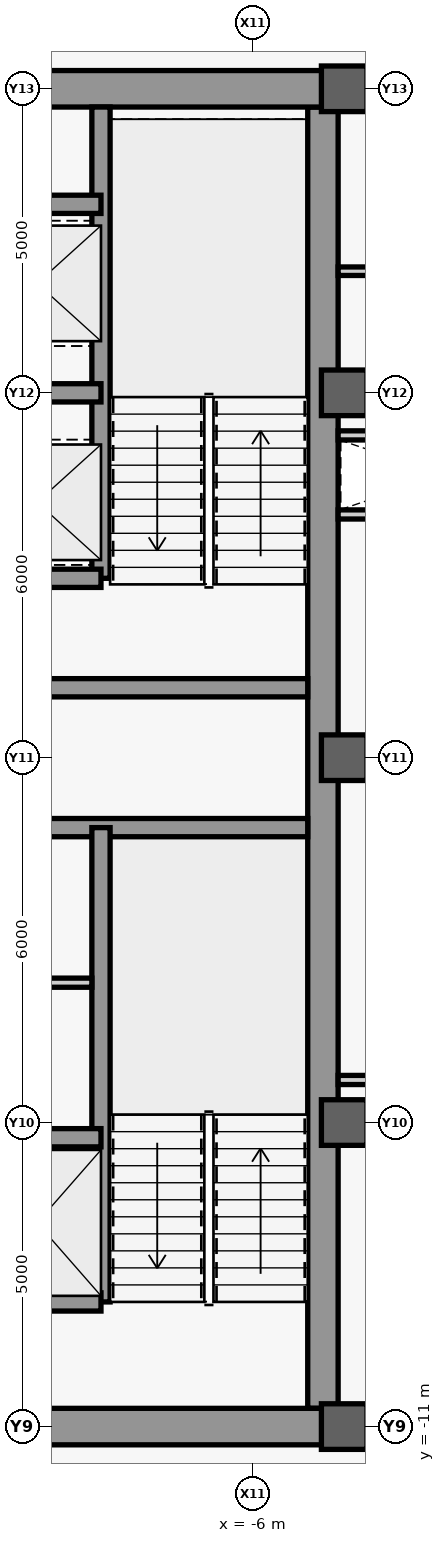
"""IFC4 building model, lengths in metres.
Left out: names, types, materials, properties, quantities, classifications, styles, units other than length and angle.
Written with IfcOpenShell. Run it as: python <this file> out.ifc"""

import sys

from ifc_helpers import new_model, si_unit, direction, frame, frame_2d, origin, origin_2d, place, context, subcontext, project, spatial, rectangle, extrude, source, transform, mapped, element, save


model = new_model("IFC4")
c1 = context("Model", 3, precision=1e-05, world=origin(), true_north=direction((0.0, 1.0)))
c2 = subcontext(c1, "Body", "Model", "MODEL_VIEW")
j1 = project(units=[si_unit("LENGTHUNIT", "METRE"), si_unit("PLANEANGLEUNIT", "RADIAN")], contexts=[c1])
p1 = place(None, origin())
s1 = spatial("IfcSite", under=j1, at=p1, CompositionType="ELEMENT")
p2 = place(p1, origin())
s2 = spatial("IfcBuilding", under=s1, at=p2, CompositionType="ELEMENT")
p3 = place(p2, frame((0.0, 0.0, 317.5)))
s3 = spatial("IfcBuildingStorey", under=s2, at=p3, CompositionType="ELEMENT", Elevation=317.5)
m1 = source(origin(), c2, "Body", "SweptSolid", [
    extrude(rectangle(XDim=21.4, YDim=0.5, at=frame_2d((10.7, 0.0))), origin(), (0.0, 0.0, 1.0), 3.78),
])
p4 = place(p3, frame((-4.85, -10.7, 0.0), z_axis=(0.0, 0.0, 1.0), x_axis=(0.0, 1.0, 0.0)))
e1 = element("IfcWall", 1, at=p4, inside=s3, PredefinedType="SHEAR", context=c2, shape_type="MappedRepresentation", body=[
    mapped(m1, transform((0.0, 0.0, 0.0), scale=1.0)),
])
m2 = source(origin(), c2, "Body", "SweptSolid", [
    extrude(rectangle(XDim=5.9, YDim=0.6, at=frame_2d((2.95, 0.0))), origin(), (0.0, 0.0, 1.0), 3.78),
])
for number, where, z_axis, x_axis in (
    (2, (-10.75, -11.0, 0.0), (0.0, 0.0, 1.0), (1.0, 0.0, 0.0)),
    (3, (-10.75, 11.0, 0.0), (0.0, 0.0, 1.0), (1.0, 0.0, 0.0)),
):
    element("IfcWall", number, at=place(p3, frame(where, z_axis=z_axis, x_axis=x_axis)), inside=s3, PredefinedType="SHEAR", context=c2, shape_type="MappedRepresentation", body=[
        mapped(m2, transform((0.0, 0.0, 0.0), scale=1.0)),
    ])
m3 = source(origin(), c2, "Body", "SweptSolid", [
    extrude(rectangle(XDim=5.65, YDim=0.3, at=frame_2d((2.825, 0.0))), origin(), (0.0, 0.0, 1.0), 3.78),
])
for number, where, z_axis, x_axis in (
    (4, (-10.75, -1.15, 0.0), (0.0, 0.0, 1.0), (1.0, 0.0, 0.0)),
    (5, (-10.75, 1.15, 0.0), (0.0, 0.0, 1.0), (1.0, 0.0, 0.0)),
):
    element("IfcWall", number, at=place(p3, frame(where, z_axis=z_axis, x_axis=x_axis)), inside=s3, PredefinedType="SHEAR", context=c2, shape_type="MappedRepresentation", body=[
        mapped(m3, transform((0.0, 0.0, 0.0), scale=1.0)),
    ])
m4 = source(origin(), c2, "Body", "SweptSolid", [
    extrude(rectangle(XDim=9.2, YDim=0.5, at=frame_2d((4.6, 0.0))), origin(), (0.0, 0.0, 1.0), 3.78),
])
p5 = place(p3, frame((-4.6, -11.0, 0.0), z_axis=(0.0, 0.0, 1.0), x_axis=(1.0, 0.0, 0.0)))
e6 = element("IfcWall", 6, at=p5, inside=s3, PredefinedType="SHEAR", context=c2, shape_type="MappedRepresentation", body=[
    mapped(m4, transform((0.0, 0.0, 0.0), scale=1.0)),
])
m5 = source(origin(), c2, "Body", "SweptSolid", [
    extrude(rectangle(XDim=1.8, YDim=2.25, at=frame_2d((0.9, 1.125))), frame((0.0, 0.26, 0.0), z_axis=(0.0, -1.0, 0.0), x_axis=(1.0, 0.0, 0.0)), (0.0, 0.0, 1.0), 0.52),
])
p6 = place(p5, frame((3.7, 0.0, 0.0)))
e7 = element("IfcOpeningElement", 7, at=p6, cuts=e6, PredefinedType="OPENING", context=c2, shape_type="MappedRepresentation", body=[
    mapped(m5, transform((0.0, 0.0, 0.0), scale=1.0)),
])
p7 = place(p3, frame((-4.6, 11.0, 0.0), z_axis=(0.0, 0.0, 1.0), x_axis=(1.0, 0.0, 0.0)))
e8 = element("IfcWall", 8, at=p7, inside=s3, PredefinedType="SHEAR", context=c2, shape_type="MappedRepresentation", body=[
    mapped(m4, transform((0.0, 0.0, 0.0), scale=1.0)),
])
m6 = source(origin(), c2, "Body", "SweptSolid", [
    extrude(rectangle(XDim=0.75, YDim=0.75, at=origin_2d()), origin(), (0.0, 0.0, 1.0), 4.0),
])
for number, where, z_axis, x_axis in (
    (9, (-4.5, -11.0, 0.0), (0.0, 0.0, 1.0), (1.0, 0.0, 0.0)),
    (10, (-4.5, -6.0, 0.0), (0.0, 0.0, 1.0), (1.0, 0.0, 0.0)),
    (11, (-4.5, 0.0, 0.0), (0.0, 0.0, 1.0), (1.0, 0.0, 0.0)),
    (12, (-4.5, 6.0, 0.0), (0.0, 0.0, 1.0), (1.0, 0.0, 0.0)),
    (13, (-4.5, 11.0, 0.0), (0.0, 0.0, 1.0), (1.0, 0.0, 0.0)),
):
    element("IfcColumn", number, at=place(p3, frame(where, z_axis=z_axis, x_axis=x_axis)), inside=s3, PredefinedType="COLUMN", context=c2, shape_type="MappedRepresentation", body=[
        mapped(m6, transform((0.0, 0.0, 0.0), scale=1.0)),
    ])
m7 = source(origin(), c2, "Body", "SweptSolid", [
    extrude(rectangle(XDim=7.8, YDim=0.3, at=frame_2d((3.9, 0.0))), origin(), (0.0, 0.0, 1.0), 3.78),
])
p8 = place(p3, frame((-8.5, -8.95, 0.0), z_axis=(0.0, 0.0, 1.0), x_axis=(0.0, 1.0, 0.0)))
e14 = element("IfcWall", 14, at=p8, inside=s3, PredefinedType="SHEAR", context=c2, shape_type="MappedRepresentation", body=[
    mapped(m7, transform((0.0, 0.0, 0.0), scale=1.0)),
])
m8 = source(origin(), c2, "Body", "SweptSolid", [
    extrude(rectangle(XDim=2.2, YDim=0.3, at=frame_2d((1.1, 0.0))), origin(), (0.0, 0.0, 1.0), 3.78),
])
for number, where, z_axis, x_axis in (
    (15, (-10.7, -8.95, 0.0), (0.0, 0.0, 1.0), (1.0, 0.0, 0.0)),
    (16, (-10.7, -6.25, 0.0), (0.0, 0.0, 1.0), (1.0, 0.0, 0.0)),
):
    element("IfcWall", number, at=place(p3, frame(where, z_axis=z_axis, x_axis=x_axis)), inside=s3, PredefinedType="SHEAR", context=c2, shape_type="MappedRepresentation", body=[
        mapped(m8, transform((0.0, 0.0, 0.0), scale=1.0)),
    ])
m9 = source(origin(), c2, "Body", "SweptSolid", [
    extrude(rectangle(XDim=7.75, YDim=0.3, at=frame_2d((3.875, 0.0))), origin(), (0.0, 0.0, 1.0), 3.78),
])
p9 = place(p3, frame((-8.5, 2.95, 0.0), z_axis=(0.0, 0.0, 1.0), x_axis=(0.0, 1.0, 0.0)))
e17 = element("IfcWall", 17, at=p9, inside=s3, PredefinedType="SHEAR", context=c2, shape_type="MappedRepresentation", body=[
    mapped(m9, transform((0.0, 0.0, 0.0), scale=1.0)),
])
for number, where, z_axis, x_axis in (
    (18, (-10.7, 2.95, 0.0), (0.0, 0.0, 1.0), (1.0, 0.0, 0.0)),
    (19, (-10.7, 6.0, 0.0), (0.0, 0.0, 1.0), (1.0, 0.0, 0.0)),
    (20, (-10.7, 9.1, 0.0), (0.0, 0.0, 1.0), (1.0, 0.0, 0.0)),
):
    element("IfcWall", number, at=place(p3, frame(where, z_axis=z_axis, x_axis=x_axis)), inside=s3, PredefinedType="SHEAR", context=c2, shape_type="MappedRepresentation", body=[
        mapped(m8, transform((0.0, 0.0, 0.0), scale=1.0)),
    ])
m10 = source(origin(), c2, "Body", "SweptSolid", [
    extrude(rectangle(XDim=2.05, YDim=0.15, at=frame_2d((1.025, 0.0))), origin(), (0.0, 0.0, 1.0), 3.78),
])
p10 = place(p3, frame((-10.7, -3.7, 0.0), z_axis=(0.0, 0.0, 1.0), x_axis=(1.0, 0.0, 0.0)))
e21 = element("IfcWall", 21, at=p10, inside=s3, PredefinedType="PARTITIONING", context=c2, shape_type="MappedRepresentation", body=[
    mapped(m10, transform((0.0, 0.0, 0.0), scale=1.0)),
])
m11 = source(origin(), c2, "Body", "SweptSolid", [
    extrude(rectangle(XDim=3.45, YDim=0.15, at=frame_2d((1.725, 0.0))), origin(), (0.0, 0.0, 1.0), 3.78),
])
for number, where, z_axis, x_axis in (
    (22, (-4.6, 4.0, 0.0), (0.0, 0.0, 1.0), (1.0, 0.0, 0.0)),
    (23, (-4.6, -5.3, 0.0), (0.0, 0.0, 1.0), (1.0, 0.0, 0.0)),
):
    element("IfcWall", number, at=place(p3, frame(where, z_axis=z_axis, x_axis=x_axis)), inside=s3, PredefinedType="PARTITIONING", context=c2, shape_type="MappedRepresentation", body=[
        mapped(m11, transform((0.0, 0.0, 0.0), scale=1.0)),
    ])
m12 = source(origin(), c2, "Body", "SweptSolid", [
    extrude(rectangle(XDim=3.45, YDim=0.14, at=frame_2d((1.725, 0.0))), origin(), (0.0, 0.0, 1.0), 3.78),
])
p11 = place(p3, frame((-4.6, 8.0, 0.0), z_axis=(0.0, 0.0, 1.0), x_axis=(1.0, 0.0, 0.0)))
e24 = element("IfcWall", 24, at=p11, inside=s3, PredefinedType="PARTITIONING", context=c2, shape_type="MappedRepresentation", body=[
    mapped(m12, transform((0.0, 0.0, 0.0), scale=1.0)),
])
p12 = place(p3, frame((-4.6, 5.3, 0.0), z_axis=(0.0, 0.0, 1.0), x_axis=(1.0, 0.0, 0.0)))
e25 = element("IfcWall", 25, at=p12, inside=s3, PredefinedType="PARTITIONING", context=c2, shape_type="MappedRepresentation", body=[
    mapped(m11, transform((0.0, 0.0, 0.0), scale=1.0)),
])
save(model, sys.argv[1])
